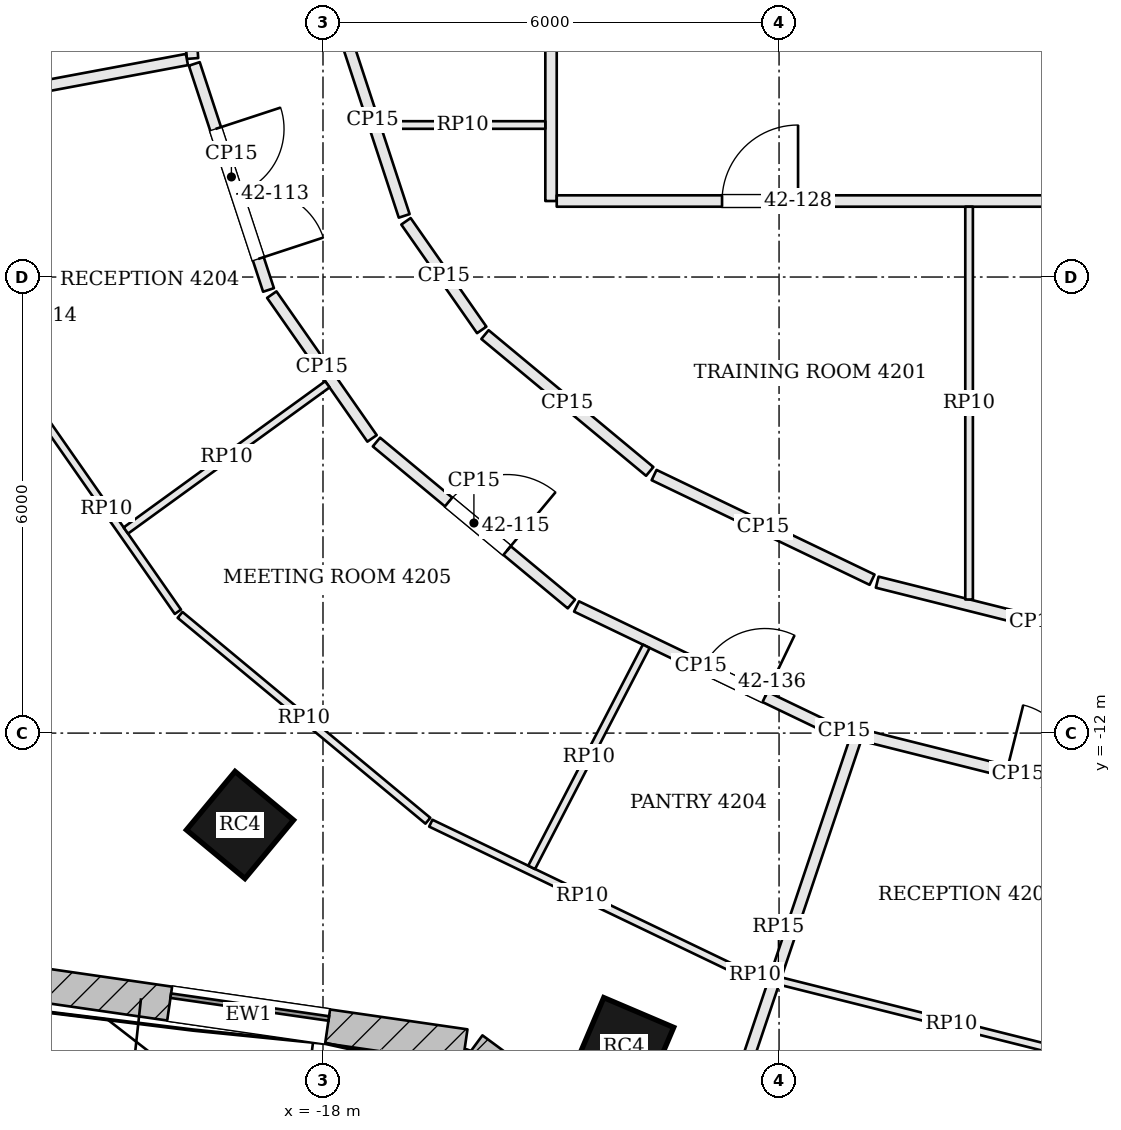
"""IFC4 building model, lengths in metres.
Left out: names, types, materials, properties, quantities, classifications, styles, units other than length and angle.
Written with IfcOpenShell. Run it as: python <this file> out.ifc"""

import sys

from ifc_helpers import new_model, si_unit, direction, frame, frame_2d, origin, origin_2d, place, context, subcontext, project, spatial, rectangle, extrude, element, fill, save


model = new_model("IFC4")
c1 = context("Model", 3, precision=1e-05, world=origin(), true_north=direction((0.0, 1.0)))
c2 = subcontext(c1, "Body", "Model", "MODEL_VIEW")
j1 = project(units=[si_unit("LENGTHUNIT", "METRE"), si_unit("PLANEANGLEUNIT", "RADIAN")], contexts=[c1])
p1 = place(None, origin())
s1 = spatial("IfcSite", under=j1, at=p1, CompositionType="ELEMENT")
p2 = place(p1, origin())
s2 = spatial("IfcBuilding", under=s1, at=p2, CompositionType="ELEMENT")
p3 = place(p2, frame((0.0, 0.0, 174.0)))
s3 = spatial("IfcBuildingStorey", under=s2, at=p3, CompositionType="ELEMENT", Elevation=174.0)
for number, where, z_axis, x_axis in (
    (1, (-19.092, -13.209, -0.7), (0.0, 0.0, 1.0), (0.769, -0.639, 0.0)),
    (2, (-14.042, -16.136, -0.7), (0.0, 0.0, 1.0), (0.92, -0.392, 0.0)),
):
    element("IfcColumn", number, at=place(p3, frame(where, z_axis=z_axis, x_axis=x_axis)), inside=s3, PredefinedType="COLUMN", context=c2, shape_type="SweptSolid", body=[
        extrude(rectangle(XDim=1.0, YDim=1.0, at=origin_2d()), origin(), (0.0, 0.0, 1.0), 4.6),
    ])
p4 = place(p3, frame((-21.825, -15.297, 0.0), z_axis=(0.0, 0.0, 1.0), x_axis=(0.98971474215, -0.143054986527, 0.0)))
e3 = element("IfcWall", 3, at=p4, inside=s3, PredefinedType="SOLIDWALL", context=c2, shape_type="SweptSolid", body=[
    extrude(rectangle(XDim=5.753, YDim=0.45, at=frame_2d((2.876, 0.0))), origin(), (0.0, 0.0, 1.0), 3.7),
])
p5 = place(p4, frame((1.826, 0.0, 0.9)))
e4 = element("IfcOpeningElement", 4, at=p5, cuts=e3, PredefinedType="OPENING", context=c2, shape_type="SweptSolid", body=[
    extrude(rectangle(XDim=2.1, YDim=2.3, at=frame_2d((1.05, 1.15))), frame((0.0, 0.235, 0.0), z_axis=(0.0, -1.0, 0.0), x_axis=(1.0, 0.0, 0.0)), (0.0, 0.0, 1.0), 0.47),
])
p6 = place(p3, frame((-16.036, -16.158, 0.0), z_axis=(0.0, 0.0, 1.0), x_axis=(0.805181432967, -0.593028549064, 0.0)))
e5 = element("IfcWall", 5, at=p6, inside=s3, PredefinedType="SOLIDWALL", context=c2, shape_type="SweptSolid", body=[
    extrude(rectangle(XDim=3.469, YDim=0.45, at=frame_2d((1.734, 0.0))), origin(), (0.0, 0.0, 1.0), 3.7),
])
p7 = place(p6, frame((0.684, 0.0, 0.9)))
e6 = element("IfcOpeningElement", 6, at=p7, cuts=e5, PredefinedType="OPENING", context=c2, shape_type="SweptSolid", body=[
    extrude(rectangle(XDim=2.1, YDim=2.3, at=frame_2d((1.05, 1.15))), frame((0.0, 0.235, 0.0), z_axis=(0.0, -1.0, 0.0), x_axis=(1.0, 0.0, 0.0)), (0.0, 0.0, 1.0), 0.47),
])
p8 = place(p3, frame((-16.019, -16.195, 0.0), z_axis=(0.0, 0.0, 1.0), x_axis=(-0.362641522028, -0.931928713208, 0.0)))
e7 = element("IfcWall", 7, at=p8, inside=s3, PredefinedType="SOLIDWALL", context=c2, shape_type="SweptSolid", body=[
    extrude(rectangle(XDim=1.75, YDim=0.2, at=frame_2d((0.875, 0.0))), origin(), (0.0, 0.0, 1.0), 3.7),
])
p9 = place(p3, frame((-19.943, -0.075, 0.0), z_axis=(0.0, 0.0, 1.0), x_axis=(0.074071611523, -0.997252924973, 0.0)))
e8 = element("IfcWall", 8, at=p9, inside=s3, PredefinedType="PARTITIONING", context=c2, shape_type="SweptSolid", body=[
    extrude(rectangle(XDim=3.059, YDim=0.15, at=frame_2d((1.529, 0.0))), origin(), (0.0, 0.0, 1.0), 3.084),
])
p10 = place(p9, frame((1.05, 0.0, 0.0)))
e9 = element("IfcOpeningElement", 9, at=p10, cuts=e8, PredefinedType="OPENING", context=c2, shape_type="SweptSolid", body=[
    extrude(rectangle(XDim=1.0, YDim=2.1, at=frame_2d((0.5, 1.05))), frame((0.0, 0.085, 0.0), z_axis=(0.0, -1.0, 0.0), x_axis=(1.0, 0.0, 0.0)), (0.0, 0.0, 1.0), 0.17),
])
p11 = place(p3, frame((-25.467, -4.199, 0.0), z_axis=(0.0, 0.0, 1.0), x_axis=(0.982998787258, 0.183612048216, 0.0)))
e10 = element("IfcWall", 10, at=p11, inside=s3, PredefinedType="PARTITIONING", context=c2, shape_type="SweptSolid", body=[
    extrude(rectangle(XDim=5.775, YDim=0.15, at=frame_2d((2.887, 0.0))), origin(), (0.0, 0.0, 1.0), 3.234),
])
p12 = place(p3, frame((-19.693, -3.196, 0.0), z_axis=(0.0, 0.0, 1.0), x_axis=(0.311918951318, -0.950108713679, 0.0)))
e11 = element("IfcWall", 11, at=p12, inside=s3, PredefinedType="PARTITIONING", context=c2, shape_type="SweptSolid", body=[
    extrude(rectangle(XDim=3.13, YDim=0.15, at=frame_2d((1.565, 0.0))), origin(), (0.0, 0.0, 1.0), 3.084),
])
p13 = place(p12, frame((0.9, 0.0, 0.0)))
e12 = element("IfcOpeningElement", 12, at=p13, cuts=e11, PredefinedType="OPENING", context=c2, shape_type="SweptSolid", body=[
    extrude(rectangle(XDim=1.8, YDim=2.1, at=frame_2d((0.9, 1.05))), frame((0.0, 0.085, 0.0), z_axis=(0.0, -1.0, 0.0), x_axis=(1.0, 0.0, 0.0)), (0.0, 0.0, 1.0), 0.17),
])
p14 = place(p3, frame((-18.674, -6.232, 0.0), z_axis=(0.0, 0.0, 1.0), x_axis=(0.572118665737, -0.820170855563, 0.0)))
e13 = element("IfcWall", 13, at=p14, inside=s3, PredefinedType="PARTITIONING", context=c2, shape_type="SweptSolid", body=[
    extrude(rectangle(XDim=2.306, YDim=0.15, at=frame_2d((1.153, 0.0))), origin(), (0.0, 0.0, 1.0), 3.084),
])
p15 = place(p3, frame((-17.297, -8.171, 0.0), z_axis=(0.0, 0.0, 1.0), x_axis=(0.769228575061, -0.638973707839, 0.0)))
e14 = element("IfcWall", 14, at=p15, inside=s3, PredefinedType="PARTITIONING", context=c2, shape_type="SweptSolid", body=[
    extrude(rectangle(XDim=3.334, YDim=0.15, at=frame_2d((1.667, 0.0))), origin(), (0.0, 0.0, 1.0), 3.084),
])
p16 = place(p15, frame((1.234, 0.0, 0.0)))
e15 = element("IfcOpeningElement", 15, at=p16, cuts=e14, PredefinedType="OPENING", context=c2, shape_type="SweptSolid", body=[
    extrude(rectangle(XDim=1.0, YDim=2.4, at=frame_2d((0.5, 1.2))), frame((0.0, 0.085, 0.0), z_axis=(0.0, -1.0, 0.0), x_axis=(1.0, 0.0, 0.0)), (0.0, 0.0, 1.0), 0.17),
])
p17 = place(p3, frame((-14.664, -10.334, 0.0), z_axis=(0.0, 0.0, 1.0), x_axis=(0.901507315282, -0.432763862278, 0.0)))
e16 = element("IfcWall", 16, at=p17, inside=s3, PredefinedType="PARTITIONING", context=c2, shape_type="SweptSolid", body=[
    extrude(rectangle(XDim=3.63, YDim=0.15, at=frame_2d((1.815, 0.0))), origin(), (0.0, 0.0, 1.0), 3.084),
])
p18 = place(p17, frame((1.85, 0.0, 0.0)))
e17 = element("IfcOpeningElement", 17, at=p18, cuts=e16, PredefinedType="OPENING", context=c2, shape_type="SweptSolid", body=[
    extrude(rectangle(XDim=0.9, YDim=2.1, at=frame_2d((0.45, 1.05))), frame((0.0, 0.085, 0.0), z_axis=(0.0, -1.0, 0.0), x_axis=(1.0, 0.0, 0.0)), (0.0, 0.0, 1.0), 0.17),
])
p19 = place(p3, frame((-11.319, -11.923, 0.0), z_axis=(0.0, 0.0, 1.0), x_axis=(0.969942256681, -0.243335198242, 0.0)))
e18 = element("IfcWall", 18, at=p19, inside=s3, PredefinedType="PARTITIONING", context=c2, shape_type="SweptSolid", body=[
    extrude(rectangle(XDim=0.359, YDim=0.15, at=frame_2d((0.18, 0.0))), origin(), (0.0, 0.0, 1.0), 3.084),
])
p20 = place(p3, frame((-13.024, -18.112, 0.0), z_axis=(0.0, 0.0, 1.0), x_axis=(0.319081027508, 0.947727438605, 0.0)))
e19 = element("IfcWall", 19, at=p20, inside=s3, PredefinedType="PARTITIONING", context=c2, shape_type="SweptSolid", body=[
    extrude(rectangle(XDim=6.363, YDim=0.15, at=frame_2d((3.181, 0.0))), origin(), (0.0, 0.0, 1.0), 3.234),
])
p21 = place(p3, frame((-10.897, -12.029, 0.0), z_axis=(0.0, 0.0, 1.0), x_axis=(0.969999087169, -0.24310855783, 0.0)))
e20 = element("IfcWall", 20, at=p21, inside=s3, PredefinedType="PARTITIONING", context=c2, shape_type="SweptSolid", body=[
    extrude(rectangle(XDim=4.211, YDim=0.15, at=frame_2d((2.105, 0.0))), origin(), (0.0, 0.0, 1.0), 3.084),
])
p22 = place(p21, frame((1.95, 0.0, 0.0)))
e21 = element("IfcOpeningElement", 21, at=p22, cuts=e20, PredefinedType="OPENING", context=c2, shape_type="SweptSolid", body=[
    extrude(rectangle(XDim=1.8, YDim=2.1, at=frame_2d((0.9, 1.05))), frame((0.0, 0.085, 0.0), z_axis=(0.0, -1.0, 0.0), x_axis=(1.0, 0.0, 0.0)), (0.0, 0.0, 1.0), 0.17),
])
p23 = place(p3, frame((-6.553, -11.056, 0.0), z_axis=(0.0, 0.0, 1.0), x_axis=(-0.970004917182, 0.243085294995, 0.0)))
e22 = element("IfcWall", 22, at=p23, inside=s3, PredefinedType="PARTITIONING", context=c2, shape_type="SweptSolid", body=[
    extrude(rectangle(XDim=4.284, YDim=0.15, at=frame_2d((2.142, 0.0))), origin(), (0.0, 0.0, 1.0), 3.084),
])
p24 = place(p3, frame((-10.776, -9.982, 0.0), z_axis=(0.0, 0.0, 1.0), x_axis=(-0.901511079436, 0.432756020933, 0.0)))
e23 = element("IfcWall", 23, at=p24, inside=s3, PredefinedType="PARTITIONING", context=c2, shape_type="SweptSolid", body=[
    extrude(rectangle(XDim=3.181, YDim=0.15, at=frame_2d((1.59, 0.0))), origin(), (0.0, 0.0, 1.0), 3.084),
])
p25 = place(p3, frame((-13.702, -8.557, 0.0), z_axis=(0.0, 0.0, 1.0), x_axis=(-0.769221825067, 0.638981833733, 0.0)))
e24 = element("IfcWall", 24, at=p25, inside=s3, PredefinedType="PARTITIONING", context=c2, shape_type="SweptSolid", body=[
    extrude(rectangle(XDim=2.817, YDim=0.15, at=frame_2d((1.409, 0.0))), origin(), (0.0, 0.0, 1.0), 3.084),
])
p26 = place(p3, frame((-15.912, -6.696, 0.0), z_axis=(0.0, 0.0, 1.0), x_axis=(-0.572078533763, 0.820198848578, 0.0)))
e25 = element("IfcWall", 25, at=p26, inside=s3, PredefinedType="PARTITIONING", context=c2, shape_type="SweptSolid", body=[
    extrude(rectangle(XDim=1.742, YDim=0.15, at=frame_2d((0.871, 0.0))), origin(), (0.0, 0.0, 1.0), 3.084),
])
p27 = place(p3, frame((-16.932, -5.196, 0.0), z_axis=(0.0, 0.0, 1.0), x_axis=(-0.311904957484, 0.950113307715, 0.0)))
e26 = element("IfcWall", 26, at=p27, inside=s3, PredefinedType="PARTITIONING", context=c2, shape_type="SweptSolid", body=[
    extrude(rectangle(XDim=2.662, YDim=0.15, at=frame_2d((1.331, 0.0))), origin(), (0.0, 0.0, 1.0), 3.084),
])
p28 = place(p3, frame((-15.0, 7.423, 0.0), z_axis=(0.0, 0.0, 1.0), x_axis=(0.0, -1.0, 0.0)))
e27 = element("IfcWall", 27, at=p28, inside=s3, PredefinedType="PARTITIONING", context=c2, shape_type="SweptSolid", body=[
    extrude(rectangle(XDim=12.423, YDim=0.15, at=frame_2d((6.211, 0.0))), origin(), (0.0, 0.0, 1.0), 3.084),
])
p29 = place(p28, frame((5.174, 0.0, 0.0)))
e28 = element("IfcOpeningElement", 28, at=p29, cuts=e27, PredefinedType="OPENING", context=c2, shape_type="SweptSolid", body=[
    extrude(rectangle(XDim=1.0, YDim=2.1, at=frame_2d((0.5, 1.05))), frame((0.0, 0.085, 0.0), z_axis=(0.0, -1.0, 0.0), x_axis=(1.0, 0.0, 0.0)), (0.0, 0.0, 1.0), 0.17),
])
p30 = place(p3, frame((-14.925, -5.0, 0.0), z_axis=(0.0, 0.0, 1.0), x_axis=(1.0, 0.0, 0.0)))
e29 = element("IfcWall", 29, at=p30, inside=s3, PredefinedType="PARTITIONING", context=c2, shape_type="SweptSolid", body=[
    extrude(rectangle(XDim=29.925, YDim=0.15, at=frame_2d((14.962, 0.0))), origin(), (0.0, 0.0, 1.0), 3.084),
])
p31 = place(p30, frame((2.175, 0.0, 0.0)))
e30 = element("IfcOpeningElement", 30, at=p31, cuts=e29, PredefinedType="OPENING", context=c2, shape_type="SweptSolid", body=[
    extrude(rectangle(XDim=1.0, YDim=2.1, at=frame_2d((0.5, 1.05))), frame((0.0, 0.085, 0.0), z_axis=(0.0, -1.0, 0.0), x_axis=(1.0, 0.0, 0.0)), (0.0, 0.0, 1.0), 0.17),
])
p32 = place(p30, frame((14.025, 0.0, 0.0)))
e31 = element("IfcOpeningElement", 31, at=p32, cuts=e29, PredefinedType="OPENING", context=c2, shape_type="SweptSolid", body=[
    extrude(rectangle(XDim=1.8, YDim=2.1, at=frame_2d((0.9, 1.05))), frame((0.0, 0.085, 0.0), z_axis=(0.0, -1.0, 0.0), x_axis=(1.0, 0.0, 0.0)), (0.0, 0.0, 1.0), 0.17),
])
p33 = place(p30, frame((26.675, 0.0, 0.0)))
e32 = element("IfcOpeningElement", 32, at=p33, cuts=e29, PredefinedType="OPENING", context=c2, shape_type="SweptSolid", body=[
    extrude(rectangle(XDim=1.0, YDim=2.1, at=frame_2d((0.5, 1.05))), frame((0.0, 0.085, 0.0), z_axis=(0.0, -1.0, 0.0), x_axis=(1.0, 0.0, 0.0)), (0.0, 0.0, 1.0), 0.17),
])
p34 = place(p3, frame((-12.078, -15.238, 0.0), z_axis=(0.0, 0.0, 1.0), x_axis=(-0.970024978464, 0.243005228658, 0.0)))
e33 = element("IfcWall", 33, at=p34, inside=s3, PredefinedType="PARTITIONING", context=c2, shape_type="SweptSolid", body=[
    extrude(rectangle(XDim=0.489, YDim=0.1, at=frame_2d((0.245, 0.0))), origin(), (0.0, 0.0, 1.0), 3.084),
])
p35 = place(p3, frame((-12.597, -15.098, 0.0), z_axis=(0.0, 0.0, 1.0), x_axis=(-0.901514437286, 0.432749025839, 0.0)))
e34 = element("IfcWall", 34, at=p35, inside=s3, PredefinedType="PARTITIONING", context=c2, shape_type="SweptSolid", body=[
    extrude(rectangle(XDim=4.42, YDim=0.1, at=frame_2d((2.21, 0.0))), origin(), (0.0, 0.0, 1.0), 3.084),
])
p36 = place(p3, frame((-16.62, -13.153, 0.0), z_axis=(0.0, 0.0, 1.0), x_axis=(-0.76922129881, 0.638982467253, 0.0)))
e35 = element("IfcWall", 35, at=p36, inside=s3, PredefinedType="PARTITIONING", context=c2, shape_type="SweptSolid", body=[
    extrude(rectangle(XDim=4.238, YDim=0.1, at=frame_2d((2.119, 0.0))), origin(), (0.0, 0.0, 1.0), 3.084),
])
p37 = place(p3, frame((-19.909, -10.404, 0.0), z_axis=(0.0, 0.0, 1.0), x_axis=(-0.572111951901, 0.820175538828, 0.0)))
e36 = element("IfcWall", 36, at=p37, inside=s3, PredefinedType="PARTITIONING", context=c2, shape_type="SweptSolid", body=[
    extrude(rectangle(XDim=3.29, YDim=0.1, at=frame_2d((1.645, 0.0))), origin(), (0.0, 0.0, 1.0), 3.084),
])
p38 = place(p3, frame((-17.942, -7.412, 0.0), z_axis=(0.0, 0.0, 1.0), x_axis=(-0.809425321456, -0.587222827372, 0.0)))
e37 = element("IfcWall", 37, at=p38, inside=s3, PredefinedType="PARTITIONING", context=c2, shape_type="SweptSolid", body=[
    extrude(rectangle(XDim=3.275, YDim=0.1, at=frame_2d((1.638, 0.0))), origin(), (0.0, 0.0, 1.0), 3.084),
])
p39 = place(p3, frame((-13.747, -10.857, 0.0), z_axis=(0.0, 0.0, 1.0), x_axis=(-0.460160569956, -0.887835711074, 0.0)))
e38 = element("IfcWall", 38, at=p39, inside=s3, PredefinedType="PARTITIONING", context=c2, shape_type="SweptSolid", body=[
    extrude(rectangle(XDim=3.277, YDim=0.1, at=frame_2d((1.638, 0.0))), origin(), (0.0, 0.0, 1.0), 3.084),
])
p40 = place(p3, frame((-7.427, -16.404, 0.0), z_axis=(0.0, 0.0, 1.0), x_axis=(-0.970009433409, 0.243067272783, 0.0)))
e39 = element("IfcWall", 39, at=p40, inside=s3, PredefinedType="PARTITIONING", context=c2, shape_type="SweptSolid", body=[
    extrude(rectangle(XDim=4.754, YDim=0.1, at=frame_2d((2.377, 0.0))), origin(), (0.0, 0.0, 1.0), 3.084),
])
p41 = place(p3, frame((-9.5, -10.242, 0.0), z_axis=(0.0, 0.0, 1.0), x_axis=(0.0, 1.0, 0.0)))
e40 = element("IfcWall", 40, at=p41, inside=s3, PredefinedType="PARTITIONING", context=c2, shape_type="SweptSolid", body=[
    extrude(rectangle(XDim=5.167, YDim=0.1, at=frame_2d((2.583, 0.0))), origin(), (0.0, 0.0, 1.0), 3.084),
])
p42 = place(p3, frame((-17.249, -4.0, 0.0), z_axis=(0.0, 0.0, 1.0), x_axis=(1.0, 0.0, 0.0)))
e41 = element("IfcWall", 41, at=p42, inside=s3, PredefinedType="PARTITIONING", context=c2, shape_type="SweptSolid", body=[
    extrude(rectangle(XDim=2.174, YDim=0.1, at=frame_2d((1.087, 0.0))), origin(), (0.0, 0.0, 1.0), 3.084),
])
p43 = place(p5, origin())
e42 = element("IfcWindow", 42, at=p43, inside=s3, PartitioningType="SINGLE_PANEL", PredefinedType="WINDOW", context=c2, shape_type="SweptSolid", body=[
    extrude(rectangle(XDim=2.1, YDim=2.3, at=frame_2d((1.05, 1.15))), frame((0.0, 0.135, 0.0), z_axis=(0.0, -1.0, 0.0), x_axis=(1.0, 0.0, 0.0)), (0.0, 0.0, 1.0), 0.06),
])
fill(e4, e42)
p44 = place(p13, origin())
e43 = element("IfcDoor", 43, at=p44, inside=s3, OperationType="DOUBLE_DOOR_SINGLE_SWING", PredefinedType="DOOR", context=c2, shape_type="SweptSolid", body=[
    extrude(rectangle(XDim=1.8, YDim=2.1, at=frame_2d((0.9, 1.05))), frame((0.0, 0.025, 0.0), z_axis=(0.0, -1.0, 0.0), x_axis=(1.0, 0.0, 0.0)), (0.0, 0.0, 1.0), 0.05),
])
fill(e12, e43)
p45 = place(p16, origin())
e44 = element("IfcDoor", 44, at=p45, inside=s3, OperationType="SINGLE_SWING_RIGHT", PredefinedType="DOOR", context=c2, shape_type="SweptSolid", body=[
    extrude(rectangle(XDim=1.0, YDim=2.4, at=frame_2d((0.5, 1.2))), frame((0.0, 0.025, 0.0), z_axis=(0.0, -1.0, 0.0), x_axis=(1.0, 0.0, 0.0)), (0.0, 0.0, 1.0), 0.05),
])
fill(e15, e44)
p46 = place(p22, origin())
e45 = element("IfcDoor", 45, at=p46, inside=s3, OperationType="DOUBLE_DOOR_SINGLE_SWING", PredefinedType="DOOR", context=c2, shape_type="SweptSolid", body=[
    extrude(rectangle(XDim=1.8, YDim=2.1, at=frame_2d((0.9, 1.05))), frame((0.0, 0.025, 0.0), z_axis=(0.0, -1.0, 0.0), x_axis=(1.0, 0.0, 0.0)), (0.0, 0.0, 1.0), 0.05),
])
fill(e21, e45)
p47 = place(p31, origin())
e46 = element("IfcDoor", 46, at=p47, inside=s3, OperationType="SINGLE_SWING_RIGHT", PredefinedType="DOOR", context=c2, shape_type="SweptSolid", body=[
    extrude(rectangle(XDim=1.0, YDim=2.1, at=frame_2d((0.5, 1.05))), frame((0.0, 0.025, 0.0), z_axis=(0.0, -1.0, 0.0), x_axis=(1.0, 0.0, 0.0)), (0.0, 0.0, 1.0), 0.05),
])
fill(e30, e46)
p48 = place(p18, origin())
e47 = element("IfcDoor", 47, at=p48, inside=s3, OperationType="SINGLE_SWING_RIGHT", PredefinedType="DOOR", context=c2, shape_type="SweptSolid", body=[
    extrude(rectangle(XDim=0.9, YDim=2.1, at=frame_2d((0.45, 1.05))), frame((0.0, 0.025, 0.0), z_axis=(0.0, -1.0, 0.0), x_axis=(1.0, 0.0, 0.0)), (0.0, 0.0, 1.0), 0.05),
])
fill(e17, e47)
save(model, sys.argv[1])
